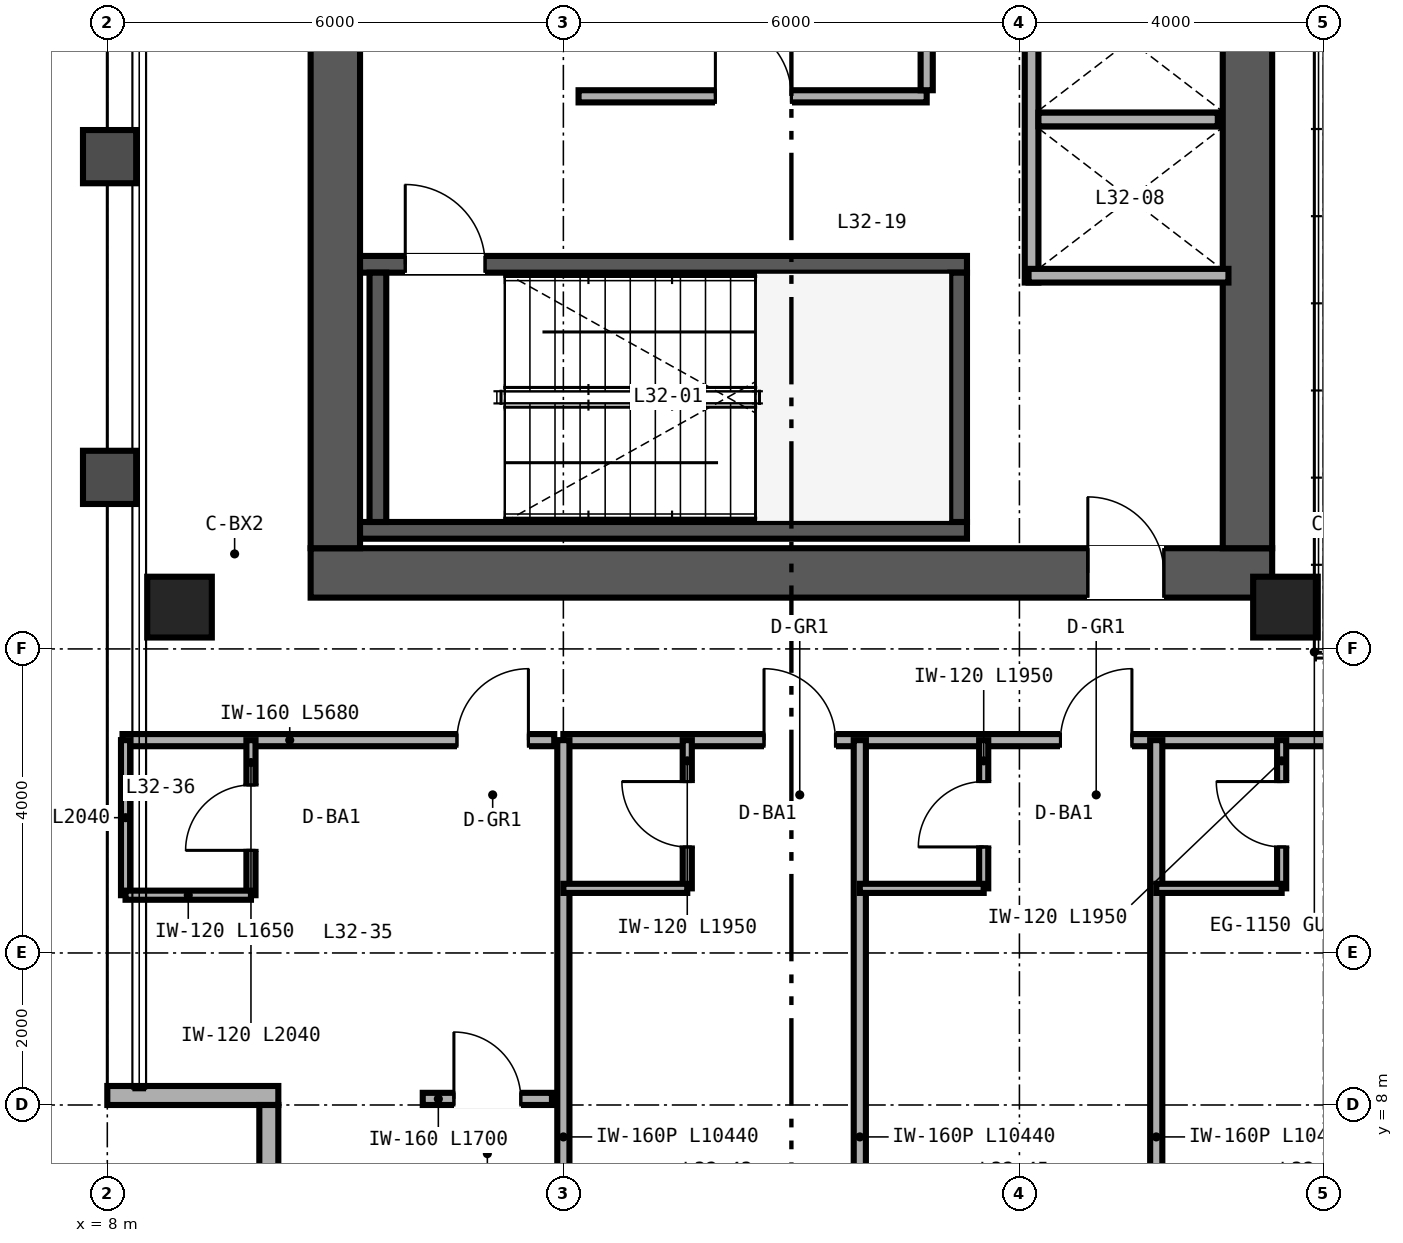
"""IFC4 building model, lengths in metres.
Left out: names, types, materials, properties, quantities, classifications, styles, units other than length and angle.
Written with IfcOpenShell. Run it as: python <this file> out.ifc"""

import sys

from ifc_helpers import new_model, si_unit, direction, frame, frame_2d, origin, origin_2d, place, context, subcontext, project, spatial, rectangle, hollow_rectangle, extrude, source, transform, mapped, element, fill, save


model = new_model("IFC4")
c1 = context("Model", 3, precision=1e-05, world=origin(), true_north=direction((0.0, 1.0)))
c2 = subcontext(c1, "Body", "Model", "MODEL_VIEW")
j1 = project(units=[si_unit("LENGTHUNIT", "METRE"), si_unit("PLANEANGLEUNIT", "RADIAN")], contexts=[c1])
p1 = place(None, origin())
s1 = spatial("IfcSite", under=j1, at=p1, CompositionType="ELEMENT")
p2 = place(p1, origin())
s2 = spatial("IfcBuilding", under=s1, at=p2, CompositionType="ELEMENT")
p3 = place(p2, frame((0.0, 0.0, 129.6)))
s3 = spatial("IfcBuildingStorey", under=s2, at=p3, CompositionType="ELEMENT", Elevation=129.6)
p4 = place(p3, frame((10.675, 15.0, 0.0), z_axis=(0.0, 0.0, 1.0), x_axis=(1.0, 0.0, 0.0)))
e1 = element("IfcWall", 1, at=p4, inside=s3, PredefinedType="SHEAR", context=c2, shape_type="SweptSolid", body=[
    extrude(rectangle(XDim=12.65, YDim=0.65, at=frame_2d((6.325, 0.0))), origin(), (0.0, 0.0, 1.0), 3.36),
])
p5 = place(p4, frame((10.225, 0.0, 0.0)))
e2 = element("IfcOpeningElement", 2, at=p5, cuts=e1, PredefinedType="OPENING", context=c2, shape_type="SweptSolid", body=[
    extrude(rectangle(XDim=1.0, YDim=2.15, at=frame_2d((0.5, 1.075))), frame((0.0, 0.335, 0.0), z_axis=(0.0, -1.0, 0.0), x_axis=(1.0, 0.0, 0.0)), (0.0, 0.0, 1.0), 0.67),
])
for number, where, z_axis, x_axis in (
    (3, (11.0, 15.325, 0.0), (0.0, 0.0, 1.0), (0.0, 1.0, 0.0)),
    (4, (23.0, 15.325, 0.0), (0.0, 0.0, 1.0), (0.0, 1.0, 0.0)),
):
    element("IfcWall", number, at=place(p3, frame(where, z_axis=z_axis, x_axis=x_axis)), inside=s3, PredefinedType="SHEAR", context=c2, shape_type="SweptSolid", body=[
        extrude(rectangle(XDim=21.35, YDim=0.65, at=frame_2d((10.675, 0.0))), origin(), (0.0, 0.0, 1.0), 3.36),
    ])
p6 = place(p3, frame((11.325, 15.56, 0.0), z_axis=(0.0, 0.0, 1.0), x_axis=(1.0, 0.0, 0.0)))
e5 = element("IfcWall", 5, at=p6, inside=s3, PredefinedType="SHEAR", context=c2, shape_type="SweptSolid", body=[
    extrude(rectangle(XDim=7.985, YDim=0.22, at=frame_2d((3.993, 0.0))), origin(), (0.0, 0.0, 1.0), 3.4),
])
p7 = place(p3, frame((11.325, 19.06, 0.0), z_axis=(0.0, 0.0, 1.0), x_axis=(1.0, 0.0, 0.0)))
e6 = element("IfcWall", 6, at=p7, inside=s3, PredefinedType="SHEAR", context=c2, shape_type="SweptSolid", body=[
    extrude(rectangle(XDim=7.985, YDim=0.22, at=frame_2d((3.993, 0.0))), origin(), (0.0, 0.0, 1.0), 3.4),
])
p8 = place(p7, frame((0.595, 0.0, 0.0)))
e7 = element("IfcOpeningElement", 7, at=p8, cuts=e6, PredefinedType="OPENING", context=c2, shape_type="SweptSolid", body=[
    extrude(rectangle(XDim=1.05, YDim=2.15, at=frame_2d((0.525, 1.075))), frame((0.0, 0.12, 0.0), z_axis=(0.0, -1.0, 0.0), x_axis=(1.0, 0.0, 0.0)), (0.0, 0.0, 1.0), 0.24),
])
for number, where, z_axis, x_axis in (
    (8, (11.56, 15.67, 0.0), (0.0, 0.0, 1.0), (0.0, 1.0, 0.0)),
    (9, (19.2, 15.67, 0.0), (0.0, 0.0, 1.0), (0.0, 1.0, 0.0)),
):
    element("IfcWall", number, at=place(p3, frame(where, z_axis=z_axis, x_axis=x_axis)), inside=s3, PredefinedType="SHEAR", context=c2, shape_type="SweptSolid", body=[
        extrude(rectangle(XDim=3.28, YDim=0.22, at=frame_2d((1.64, 0.0))), origin(), (0.0, 0.0, 1.0), 3.4),
    ])
m1 = source(origin(), c2, "Body", "SweptSolid", [
    extrude(hollow_rectangle(XDim=0.85, YDim=0.8, WallThickness=0.032, at=origin_2d()), origin(), (0.0, 0.0, 1.0), 3.36),
])
for number, where, z_axis, x_axis in (
    (10, (8.95, 14.55, 0.0), (0.0, 0.0, 1.0), (1.0, 0.0, 0.0)),
    (11, (23.5, 14.55, 0.0), (0.0, 0.0, 1.0), (1.0, 0.0, 0.0)),
):
    element("IfcColumn", number, at=place(p3, frame(where, z_axis=z_axis, x_axis=x_axis)), inside=s3, PredefinedType="COLUMN", context=c2, shape_type="MappedRepresentation", body=[
        mapped(m1, transform((0.0, 0.0, 0.0), scale=1.0)),
    ])
p9 = place(p3, frame((8.0, 8.125, 0.0), z_axis=(0.0, 0.0, 1.0), x_axis=(1.0, 0.0, 0.0)))
e12 = element("IfcWall", 12, at=p9, inside=s3, PredefinedType="SOLIDWALL", context=c2, shape_type="SweptSolid", body=[
    extrude(rectangle(XDim=2.25, YDim=0.25, at=frame_2d((1.125, 0.0))), origin(), (0.0, 0.0, 1.0), 3.36),
])
p10 = place(p3, frame((10.125, 8.0, 0.0), z_axis=(0.0, 0.0, 1.0), x_axis=(0.0, -1.0, 0.0)))
e13 = element("IfcWall", 13, at=p10, inside=s3, PredefinedType="SOLIDWALL", context=c2, shape_type="SweptSolid", body=[
    extrude(rectangle(XDim=2.0, YDim=0.25, at=frame_2d((1.0, 0.0))), origin(), (0.0, 0.0, 1.0), 3.36),
])
p11 = place(p3, frame((20.16, 18.82, 0.0), z_axis=(0.0, 0.0, 1.0), x_axis=(0.0, 1.0, 0.0)))
e14 = element("IfcWall", 14, at=p11, inside=s3, PredefinedType="SOLIDWALL", context=c2, shape_type="SweptSolid", body=[
    extrude(rectangle(XDim=6.32, YDim=0.18, at=frame_2d((3.16, 0.0))), origin(), (0.0, 0.0, 1.0), 2.36),
])
p12 = place(p3, frame((20.12, 18.91, 0.0), z_axis=(0.0, 0.0, 1.0), x_axis=(1.0, 0.0, 0.0)))
e15 = element("IfcWall", 15, at=p12, inside=s3, PredefinedType="SOLIDWALL", context=c2, shape_type="SweptSolid", body=[
    extrude(rectangle(XDim=2.63, YDim=0.18, at=frame_2d((1.315, 0.0))), origin(), (0.0, 0.0, 1.0), 3.36),
])
p13 = place(p3, frame((20.25, 20.965, 0.0), z_axis=(0.0, 0.0, 1.0), x_axis=(1.0, 0.0, 0.0)))
e16 = element("IfcWall", 16, at=p13, inside=s3, PredefinedType="SOLIDWALL", context=c2, shape_type="SweptSolid", body=[
    extrude(rectangle(XDim=2.36, YDim=0.18, at=frame_2d((1.18, 0.0))), origin(), (0.0, 0.0, 1.0), 2.36),
])
p14 = place(p3, frame((14.2, 21.27, 0.0), z_axis=(0.0, 0.0, 1.0), x_axis=(1.0, 0.0, 0.0)))
e17 = element("IfcWall", 17, at=p14, inside=s3, PredefinedType="PARTITIONING", context=c2, shape_type="SweptSolid", body=[
    extrude(rectangle(XDim=4.58, YDim=0.16, at=frame_2d((2.29, 0.0))), origin(), (0.0, 0.0, 1.0), 3.36),
])
p15 = place(p14, frame((1.8, 0.0, 0.0)))
e18 = element("IfcOpeningElement", 18, at=p15, cuts=e17, PredefinedType="OPENING", context=c2, shape_type="SweptSolid", body=[
    extrude(rectangle(XDim=1.0, YDim=2.15, at=frame_2d((0.5, 1.075))), frame((0.0, 0.09, 0.0), z_axis=(0.0, -1.0, 0.0), x_axis=(1.0, 0.0, 0.0)), (0.0, 0.0, 1.0), 0.18),
])
p16 = place(p3, frame((18.78, 21.35, 0.0), z_axis=(0.0, 0.0, 1.0), x_axis=(0.0, 1.0, 0.0)))
e19 = element("IfcWall", 19, at=p16, inside=s3, PredefinedType="PARTITIONING", context=c2, shape_type="SweptSolid", body=[
    extrude(rectangle(XDim=3.81, YDim=0.16, at=frame_2d((1.905, 0.0))), origin(), (0.0, 0.0, 1.0), 3.36),
])
p17 = place(p3, frame((8.2, 12.8, 0.0), z_axis=(0.0, 0.0, 1.0), x_axis=(1.0, 0.0, 0.0)))
e20 = element("IfcWall", 20, at=p17, inside=s3, PredefinedType="PARTITIONING", context=c2, shape_type="SweptSolid", body=[
    extrude(rectangle(XDim=5.68, YDim=0.16, at=frame_2d((2.84, 0.0))), origin(), (0.0, 0.0, 1.0), 3.36),
])
p18 = place(p17, frame((4.4, 0.0, 0.0)))
e21 = element("IfcOpeningElement", 21, at=p18, cuts=e20, PredefinedType="OPENING", context=c2, shape_type="SweptSolid", body=[
    extrude(rectangle(XDim=0.94, YDim=2.15, at=frame_2d((0.47, 1.075))), frame((0.0, 0.09, 0.0), z_axis=(0.0, -1.0, 0.0), x_axis=(1.0, 0.0, 0.0)), (0.0, 0.0, 1.0), 0.18),
])
p19 = place(p3, frame((9.89, 10.76, 0.0), z_axis=(0.0, 0.0, 1.0), x_axis=(0.0, 1.0, 0.0)))
e22 = element("IfcWall", 22, at=p19, inside=s3, PredefinedType="PARTITIONING", context=c2, shape_type="SweptSolid", body=[
    extrude(rectangle(XDim=2.04, YDim=0.12, at=frame_2d((1.02, 0.0))), origin(), (0.0, 0.0, 1.0), 3.36),
])
p20 = place(p19, frame((0.59, 0.0, 0.0)))
e23 = element("IfcOpeningElement", 23, at=p20, cuts=e22, PredefinedType="OPENING", context=c2, shape_type="SweptSolid", body=[
    extrude(rectangle(XDim=0.86, YDim=2.1, at=frame_2d((0.43, 1.05))), frame((0.0, 0.07, 0.0), z_axis=(0.0, -1.0, 0.0), x_axis=(1.0, 0.0, 0.0)), (0.0, 0.0, 1.0), 0.14),
])
p21 = place(p3, frame((8.24, 10.76, 0.0), z_axis=(0.0, 0.0, 1.0), x_axis=(0.0, 1.0, 0.0)))
e24 = element("IfcWall", 24, at=p21, inside=s3, PredefinedType="PARTITIONING", context=c2, shape_type="SweptSolid", body=[
    extrude(rectangle(XDim=2.04, YDim=0.12, at=frame_2d((1.02, 0.0))), origin(), (0.0, 0.0, 1.0), 3.36),
])
p22 = place(p3, frame((8.24, 10.76, 0.0), z_axis=(0.0, 0.0, 1.0), x_axis=(1.0, 0.0, 0.0)))
e25 = element("IfcWall", 25, at=p22, inside=s3, PredefinedType="PARTITIONING", context=c2, shape_type="SweptSolid", body=[
    extrude(rectangle(XDim=1.65, YDim=0.12, at=frame_2d((0.825, 0.0))), origin(), (0.0, 0.0, 1.0), 3.36),
])
p23 = place(p3, frame((12.15, 8.08, 0.0), z_axis=(0.0, 0.0, 1.0), x_axis=(1.0, 0.0, 0.0)))
e26 = element("IfcWall", 26, at=p23, inside=s3, PredefinedType="PARTITIONING", context=c2, shape_type="SweptSolid", body=[
    extrude(rectangle(XDim=1.7, YDim=0.16, at=frame_2d((0.85, 0.0))), origin(), (0.0, 0.0, 1.0), 3.36),
])
p24 = place(p23, frame((0.41, 0.0, 0.0)))
e27 = element("IfcOpeningElement", 27, at=p24, cuts=e26, PredefinedType="OPENING", context=c2, shape_type="SweptSolid", body=[
    extrude(rectangle(XDim=0.88, YDim=2.15, at=frame_2d((0.44, 1.075))), frame((0.0, 0.09, 0.0), z_axis=(0.0, -1.0, 0.0), x_axis=(1.0, 0.0, 0.0)), (0.0, 0.0, 1.0), 0.18),
])
p25 = place(p3, frame((14.0, 12.8, 0.0), z_axis=(0.0, 0.0, 1.0), x_axis=(1.0, 0.0, 0.0)))
e28 = element("IfcWall", 28, at=p25, inside=s3, PredefinedType="PARTITIONING", context=c2, shape_type="SweptSolid", body=[
    extrude(rectangle(XDim=36.0, YDim=0.16, at=frame_2d((18.0, 0.0))), origin(), (0.0, 0.0, 1.0), 2.581),
])
p26 = place(p25, frame((2.64, 0.0, 0.0)))
e29 = element("IfcOpeningElement", 29, at=p26, cuts=e28, PredefinedType="OPENING", context=c2, shape_type="SweptSolid", body=[
    extrude(rectangle(XDim=0.94, YDim=2.15, at=frame_2d((0.47, 1.075))), frame((0.0, 0.09, 0.0), z_axis=(0.0, -1.0, 0.0), x_axis=(1.0, 0.0, 0.0)), (0.0, 0.0, 1.0), 0.18),
])
p27 = place(p25, frame((6.54, 0.0, 0.0)))
e30 = element("IfcOpeningElement", 30, at=p27, cuts=e28, PredefinedType="OPENING", context=c2, shape_type="SweptSolid", body=[
    extrude(rectangle(XDim=0.94, YDim=2.15, at=frame_2d((0.47, 1.075))), frame((0.0, 0.09, 0.0), z_axis=(0.0, -1.0, 0.0), x_axis=(1.0, 0.0, 0.0)), (0.0, 0.0, 1.0), 0.18),
])
p28 = place(p25, frame((10.54, 0.0, 0.0)))
e31 = element("IfcOpeningElement", 31, at=p28, cuts=e28, PredefinedType="OPENING", context=c2, shape_type="SweptSolid", body=[
    extrude(rectangle(XDim=0.94, YDim=2.15, at=frame_2d((0.47, 1.075))), frame((0.0, 0.09, 0.0), z_axis=(0.0, -1.0, 0.0), x_axis=(1.0, 0.0, 0.0)), (0.0, 0.0, 1.0), 0.18),
])
p29 = place(p25, frame((14.54, 0.0, 0.0)))
e32 = element("IfcOpeningElement", 32, at=p29, cuts=e28, PredefinedType="OPENING", context=c2, shape_type="SweptSolid", body=[
    extrude(rectangle(XDim=0.94, YDim=2.15, at=frame_2d((0.47, 1.075))), frame((0.0, 0.09, 0.0), z_axis=(0.0, -1.0, 0.0), x_axis=(1.0, 0.0, 0.0)), (0.0, 0.0, 1.0), 0.18),
])
p30 = place(p25, frame((18.54, 0.0, 0.0)))
e33 = element("IfcOpeningElement", 33, at=p30, cuts=e28, PredefinedType="OPENING", context=c2, shape_type="SweptSolid", body=[
    extrude(rectangle(XDim=0.94, YDim=2.15, at=frame_2d((0.47, 1.075))), frame((0.0, 0.09, 0.0), z_axis=(0.0, -1.0, 0.0), x_axis=(1.0, 0.0, 0.0)), (0.0, 0.0, 1.0), 0.18),
])
p31 = place(p25, frame((22.54, 0.0, 0.0)))
e34 = element("IfcOpeningElement", 34, at=p31, cuts=e28, PredefinedType="OPENING", context=c2, shape_type="SweptSolid", body=[
    extrude(rectangle(XDim=0.94, YDim=2.15, at=frame_2d((0.47, 1.075))), frame((0.0, 0.09, 0.0), z_axis=(0.0, -1.0, 0.0), x_axis=(1.0, 0.0, 0.0)), (0.0, 0.0, 1.0), 0.18),
])
p32 = place(p25, frame((26.54, 0.0, 0.0)))
e35 = element("IfcOpeningElement", 35, at=p32, cuts=e28, PredefinedType="OPENING", context=c2, shape_type="SweptSolid", body=[
    extrude(rectangle(XDim=0.94, YDim=2.15, at=frame_2d((0.47, 1.075))), frame((0.0, 0.09, 0.0), z_axis=(0.0, -1.0, 0.0), x_axis=(1.0, 0.0, 0.0)), (0.0, 0.0, 1.0), 0.18),
])
p33 = place(p25, frame((30.64, 0.0, 0.0)))
e36 = element("IfcOpeningElement", 36, at=p33, cuts=e28, PredefinedType="OPENING", context=c2, shape_type="SweptSolid", body=[
    extrude(rectangle(XDim=0.94, YDim=2.15, at=frame_2d((0.47, 1.075))), frame((0.0, 0.09, 0.0), z_axis=(0.0, -1.0, 0.0), x_axis=(1.0, 0.0, 0.0)), (0.0, 0.0, 1.0), 0.18),
])
p34 = place(p25, frame((34.74, 0.0, 0.0)))
e37 = element("IfcOpeningElement", 37, at=p34, cuts=e28, PredefinedType="OPENING", context=c2, shape_type="SweptSolid", body=[
    extrude(rectangle(XDim=0.94, YDim=2.15, at=frame_2d((0.47, 1.075))), frame((0.0, 0.09, 0.0), z_axis=(0.0, -1.0, 0.0), x_axis=(1.0, 0.0, 0.0)), (0.0, 0.0, 1.0), 0.18),
])
for number, where, z_axis, x_axis in (
    (38, (14.0, 2.36, 0.0), (0.0, 0.0, 1.0), (0.0, 1.0, 0.0)),
    (39, (17.9, 2.36, 0.0), (0.0, 0.0, 1.0), (0.0, 1.0, 0.0)),
):
    element("IfcWall", number, at=place(p3, frame(where, z_axis=z_axis, x_axis=x_axis)), inside=s3, PredefinedType="PARTITIONING", context=c2, shape_type="SweptSolid", body=[
        extrude(rectangle(XDim=10.44, YDim=0.16, at=frame_2d((5.22, 0.0))), origin(), (0.0, 0.0, 1.0), 2.667),
    ])
p35 = place(p3, frame((15.63, 10.85, 0.0), z_axis=(0.0, 0.0, 1.0), x_axis=(0.0, 1.0, 0.0)))
e40 = element("IfcWall", 40, at=p35, inside=s3, PredefinedType="PARTITIONING", context=c2, shape_type="SweptSolid", body=[
    extrude(rectangle(XDim=1.95, YDim=0.12, at=frame_2d((0.975, 0.0))), origin(), (0.0, 0.0, 1.0), 3.36),
])
p36 = place(p35, frame((0.545, 0.0, 0.0)))
e41 = element("IfcOpeningElement", 41, at=p36, cuts=e40, PredefinedType="OPENING", context=c2, shape_type="SweptSolid", body=[
    extrude(rectangle(XDim=0.86, YDim=2.1, at=frame_2d((0.43, 1.05))), frame((0.0, 0.07, 0.0), z_axis=(0.0, -1.0, 0.0), x_axis=(1.0, 0.0, 0.0)), (0.0, 0.0, 1.0), 0.14),
])
p37 = place(p3, frame((14.0, 10.85, 0.0), z_axis=(0.0, 0.0, 1.0), x_axis=(1.0, 0.0, 0.0)))
e42 = element("IfcWall", 42, at=p37, inside=s3, PredefinedType="PARTITIONING", context=c2, shape_type="SweptSolid", body=[
    extrude(rectangle(XDim=1.63, YDim=0.12, at=frame_2d((0.815, 0.0))), origin(), (0.0, 0.0, 1.0), 3.36),
])
p38 = place(p3, frame((21.8, 2.36, 0.0), z_axis=(0.0, 0.0, 1.0), x_axis=(0.0, 1.0, 0.0)))
e43 = element("IfcWall", 43, at=p38, inside=s3, PredefinedType="PARTITIONING", context=c2, shape_type="SweptSolid", body=[
    extrude(rectangle(XDim=10.44, YDim=0.16, at=frame_2d((5.22, 0.0))), origin(), (0.0, 0.0, 1.0), 2.823),
])
p39 = place(p3, frame((19.53, 10.85, 0.0), z_axis=(0.0, 0.0, 1.0), x_axis=(0.0, 1.0, 0.0)))
e44 = element("IfcWall", 44, at=p39, inside=s3, PredefinedType="PARTITIONING", context=c2, shape_type="SweptSolid", body=[
    extrude(rectangle(XDim=1.95, YDim=0.12, at=frame_2d((0.975, 0.0))), origin(), (0.0, 0.0, 1.0), 3.36),
])
p40 = place(p39, frame((0.545, 0.0, 0.0)))
e45 = element("IfcOpeningElement", 45, at=p40, cuts=e44, PredefinedType="OPENING", context=c2, shape_type="SweptSolid", body=[
    extrude(rectangle(XDim=0.86, YDim=2.1, at=frame_2d((0.43, 1.05))), frame((0.0, 0.07, 0.0), z_axis=(0.0, -1.0, 0.0), x_axis=(1.0, 0.0, 0.0)), (0.0, 0.0, 1.0), 0.14),
])
p41 = place(p3, frame((17.9, 10.85, 0.0), z_axis=(0.0, 0.0, 1.0), x_axis=(1.0, 0.0, 0.0)))
e46 = element("IfcWall", 46, at=p41, inside=s3, PredefinedType="PARTITIONING", context=c2, shape_type="SweptSolid", body=[
    extrude(rectangle(XDim=1.63, YDim=0.12, at=frame_2d((0.815, 0.0))), origin(), (0.0, 0.0, 1.0), 3.36),
])
p42 = place(p3, frame((23.45, 10.85, 0.0), z_axis=(0.0, 0.0, 1.0), x_axis=(0.0, 1.0, 0.0)))
e47 = element("IfcWall", 47, at=p42, inside=s3, PredefinedType="PARTITIONING", context=c2, shape_type="SweptSolid", body=[
    extrude(rectangle(XDim=1.95, YDim=0.12, at=frame_2d((0.975, 0.0))), origin(), (0.0, 0.0, 1.0), 2.581),
])
p43 = place(p42, frame((0.545, 0.0, 0.0)))
e48 = element("IfcOpeningElement", 48, at=p43, cuts=e47, PredefinedType="OPENING", context=c2, shape_type="SweptSolid", body=[
    extrude(rectangle(XDim=0.86, YDim=2.1, at=frame_2d((0.43, 1.05))), frame((0.0, 0.07, 0.0), z_axis=(0.0, -1.0, 0.0), x_axis=(1.0, 0.0, 0.0)), (0.0, 0.0, 1.0), 0.14),
])
p44 = place(p3, frame((21.8, 10.85, 0.0), z_axis=(0.0, 0.0, 1.0), x_axis=(1.0, 0.0, 0.0)))
e49 = element("IfcWall", 49, at=p44, inside=s3, PredefinedType="PARTITIONING", context=c2, shape_type="SweptSolid", body=[
    extrude(rectangle(XDim=1.65, YDim=0.12, at=frame_2d((0.825, 0.0))), origin(), (0.0, 0.0, 1.0), 2.581),
])
m2 = source(origin(), c2, "Body", "SweptSolid", [
    extrude(rectangle(XDim=1.05, YDim=2.15, at=frame_2d((0.525, 1.075))), frame((0.0, 0.025, 0.0), z_axis=(0.0, -1.0, 0.0), x_axis=(1.0, 0.0, 0.0)), (0.0, 0.0, 1.0), 0.05),
])
p45 = place(p8, origin())
e50 = element("IfcDoor", 50, at=p45, inside=s3, OperationType="SINGLE_SWING_LEFT", PredefinedType="DOOR", context=c2, shape_type="MappedRepresentation", body=[
    mapped(m2, transform((0.0, 0.0, 0.0), scale=1.0)),
])
fill(e7, e50)
m3 = source(origin(), c2, "Body", "SweptSolid", [
    extrude(rectangle(XDim=1.0, YDim=2.15, at=frame_2d((0.5, 1.075))), frame((0.0, 0.025, 0.0), z_axis=(0.0, -1.0, 0.0), x_axis=(1.0, 0.0, 0.0)), (0.0, 0.0, 1.0), 0.05),
])
p46 = place(p15, origin())
e51 = element("IfcDoor", 51, at=p46, inside=s3, OperationType="SINGLE_SWING_LEFT", PredefinedType="DOOR", context=c2, shape_type="MappedRepresentation", body=[
    mapped(m3, transform((0.0, 0.0, 0.0), scale=1.0)),
])
fill(e18, e51)
p47 = place(p5, origin())
e52 = element("IfcDoor", 52, at=p47, inside=s3, OperationType="SINGLE_SWING_LEFT", PredefinedType="DOOR", context=c2, shape_type="MappedRepresentation", body=[
    mapped(m3, transform((0.0, 0.0, 0.0), scale=1.0)),
])
fill(e2, e52)
m4 = source(origin(), c2, "Body", "SweptSolid", [
    extrude(rectangle(XDim=0.86, YDim=2.1, at=frame_2d((0.43, 1.05))), frame((0.0, 0.025, 0.0), z_axis=(0.0, -1.0, 0.0), x_axis=(1.0, 0.0, 0.0)), (0.0, 0.0, 1.0), 0.05),
])
p48 = place(p20, origin())
e53 = element("IfcDoor", 53, at=p48, inside=s3, OperationType="SINGLE_SWING_LEFT", PredefinedType="DOOR", context=c2, shape_type="MappedRepresentation", body=[
    mapped(m4, transform((0.0, 0.0, 0.0), scale=1.0)),
])
fill(e23, e53)
m5 = source(origin(), c2, "Body", "SweptSolid", [
    extrude(rectangle(XDim=0.94, YDim=2.15, at=frame_2d((0.47, 1.075))), frame((0.0, 0.025, 0.0), z_axis=(0.0, -1.0, 0.0), x_axis=(1.0, 0.0, 0.0)), (0.0, 0.0, 1.0), 0.05),
])
p49 = place(p18, origin())
e54 = element("IfcDoor", 54, at=p49, inside=s3, OperationType="SINGLE_SWING_RIGHT", PredefinedType="DOOR", context=c2, shape_type="MappedRepresentation", body=[
    mapped(m5, transform((0.0, 0.0, 0.0), scale=1.0)),
])
fill(e21, e54)
m6 = source(origin(), c2, "Body", "SweptSolid", [
    extrude(rectangle(XDim=0.88, YDim=2.15, at=frame_2d((0.44, 1.075))), frame((0.0, 0.025, 0.0), z_axis=(0.0, -1.0, 0.0), x_axis=(1.0, 0.0, 0.0)), (0.0, 0.0, 1.0), 0.05),
])
p50 = place(p24, origin())
e55 = element("IfcDoor", 55, at=p50, inside=s3, OperationType="SINGLE_SWING_LEFT", PredefinedType="DOOR", context=c2, shape_type="MappedRepresentation", body=[
    mapped(m6, transform((0.0, 0.0, 0.0), scale=1.0)),
])
fill(e27, e55)
p51 = place(p36, origin())
e56 = element("IfcDoor", 56, at=p51, inside=s3, OperationType="SINGLE_SWING_RIGHT", PredefinedType="DOOR", context=c2, shape_type="MappedRepresentation", body=[
    mapped(m4, transform((0.0, 0.0, 0.0), scale=1.0)),
])
fill(e41, e56)
p52 = place(p40, origin())
e57 = element("IfcDoor", 57, at=p52, inside=s3, OperationType="SINGLE_SWING_LEFT", PredefinedType="DOOR", context=c2, shape_type="MappedRepresentation", body=[
    mapped(m4, transform((0.0, 0.0, 0.0), scale=1.0)),
])
fill(e45, e57)
p53 = place(p43, origin())
e58 = element("IfcDoor", 58, at=p53, inside=s3, OperationType="SINGLE_SWING_RIGHT", PredefinedType="DOOR", context=c2, shape_type="MappedRepresentation", body=[
    mapped(m4, transform((0.0, 0.0, 0.0), scale=1.0)),
])
fill(e48, e58)
p54 = place(p26, origin())
e59 = element("IfcDoor", 59, at=p54, inside=s3, OperationType="SINGLE_SWING_LEFT", PredefinedType="DOOR", context=c2, shape_type="MappedRepresentation", body=[
    mapped(m5, transform((0.0, 0.0, 0.0), scale=1.0)),
])
fill(e29, e59)
p55 = place(p27, origin())
e60 = element("IfcDoor", 60, at=p55, inside=s3, OperationType="SINGLE_SWING_RIGHT", PredefinedType="DOOR", context=c2, shape_type="MappedRepresentation", body=[
    mapped(m5, transform((0.0, 0.0, 0.0), scale=1.0)),
])
fill(e30, e60)
save(model, sys.argv[1])
